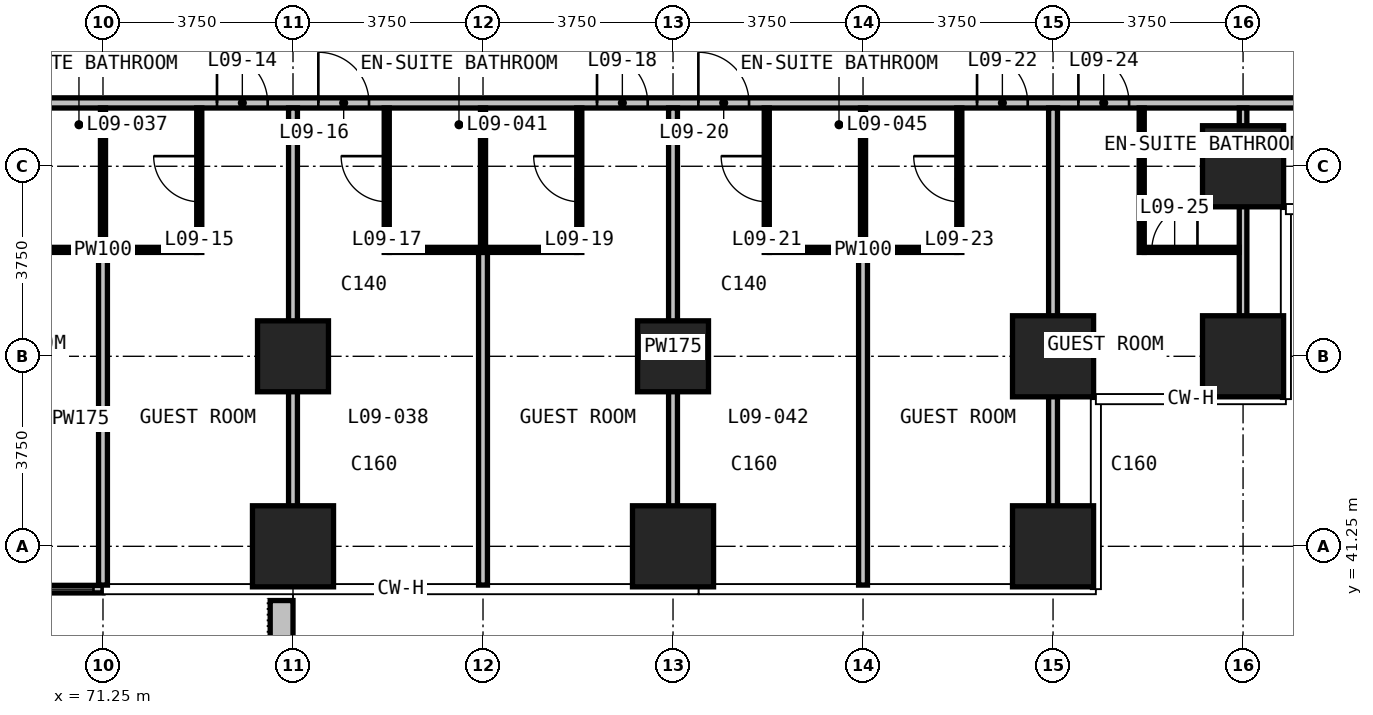
"""IFC4 building model, lengths in metres.
Left out: names, types, materials, properties, quantities, classifications, styles, units other than length and angle.
Written with IfcOpenShell. Run it as: python <this file> out.ifc"""

import sys

from ifc_helpers import new_model, si_unit, direction, frame, frame_2d, origin, origin_2d, place, context, subcontext, project, spatial, rectangle, extrude, element, fill, save


model = new_model("IFC4")
c1 = context("Model", 3, precision=1e-05, world=origin(), true_north=direction((0.0, 1.0)))
c2 = subcontext(c1, "Body", "Model", "MODEL_VIEW")
j1 = project(units=[si_unit("LENGTHUNIT", "METRE"), si_unit("PLANEANGLEUNIT", "RADIAN")], contexts=[c1])
p1 = place(None, origin())
s1 = spatial("IfcSite", under=j1, at=p1, CompositionType="ELEMENT")
p2 = place(p1, origin())
s2 = spatial("IfcBuilding", under=s1, at=p2, CompositionType="ELEMENT")
p3 = place(p2, frame((0.0, 0.0, 49.4)))
s3 = spatial("IfcBuildingStorey", under=s2, at=p3, CompositionType="ELEMENT", Elevation=49.4)
p4 = place(p3, frame((75.0, 41.25, 0.0), z_axis=(0.0, 0.0, 1.0), x_axis=(1.0, 0.0, 0.0)))
e1 = element("IfcColumn", 1, at=p4, inside=s3, PredefinedType="COLUMN", context=c2, shape_type="SweptSolid", body=[
    extrude(rectangle(XDim=1.6, YDim=1.6, at=origin_2d()), origin(), (0.0, 0.0, 1.0), 3.3),
])
p5 = place(p3, frame((75.0, 45.0, 0.0), z_axis=(0.0, 0.0, 1.0), x_axis=(1.0, 0.0, 0.0)))
e2 = element("IfcColumn", 2, at=p5, inside=s3, PredefinedType="COLUMN", context=c2, shape_type="SweptSolid", body=[
    extrude(rectangle(XDim=1.4, YDim=1.4, at=origin_2d()), origin(), (0.0, 0.0, 1.0), 3.3),
])
p6 = place(p3, frame((82.5, 41.25, 0.0), z_axis=(0.0, 0.0, 1.0), x_axis=(1.0, 0.0, 0.0)))
e3 = element("IfcColumn", 3, at=p6, inside=s3, PredefinedType="COLUMN", context=c2, shape_type="SweptSolid", body=[
    extrude(rectangle(XDim=1.6, YDim=1.6, at=origin_2d()), origin(), (0.0, 0.0, 1.0), 3.3),
])
p7 = place(p3, frame((82.5, 45.0, 0.0), z_axis=(0.0, 0.0, 1.0), x_axis=(1.0, 0.0, 0.0)))
e4 = element("IfcColumn", 4, at=p7, inside=s3, PredefinedType="COLUMN", context=c2, shape_type="SweptSolid", body=[
    extrude(rectangle(XDim=1.4, YDim=1.4, at=origin_2d()), origin(), (0.0, 0.0, 1.0), 3.3),
])
for number, where, z_axis, x_axis in (
    (5, (90.0, 41.25, 0.0), (0.0, 0.0, 1.0), (1.0, 0.0, 0.0)),
    (6, (90.0, 45.0, 0.0), (0.0, 0.0, 1.0), (1.0, 0.0, 0.0)),
    (7, (93.75, 45.0, 0.0), (0.0, 0.0, 1.0), (1.0, 0.0, 0.0)),
    (8, (93.75, 48.75, 0.0), (0.0, 0.0, 1.0), (1.0, 0.0, 0.0)),
):
    element("IfcColumn", number, at=place(p3, frame(where, z_axis=z_axis, x_axis=x_axis)), inside=s3, PredefinedType="COLUMN", context=c2, shape_type="SweptSolid", body=[
        extrude(rectangle(XDim=1.6, YDim=1.6, at=origin_2d()), origin(), (0.0, 0.0, 1.0), 3.3),
    ])
p8 = place(p3, frame((67.5, 40.405, 0.0), z_axis=(0.0, 0.0, 1.0), x_axis=(1.0, 0.0, 0.0)))
e9 = element("IfcWall", 9, at=p8, inside=s3, PredefinedType="SOLIDWALL", context=c2, shape_type="SweptSolid", body=[
    extrude(rectangle(XDim=3.75, YDim=0.15, at=frame_2d((1.875, 0.0))), origin(), (0.0, 0.0, 1.0), 3.0),
])
p9 = place(p8, frame((1.275, 0.0, 0.0)))
e10 = element("IfcOpeningElement", 10, at=p9, cuts=e9, PredefinedType="OPENING", context=c2, shape_type="SweptSolid", body=[
    extrude(rectangle(XDim=1.2, YDim=2.4, at=frame_2d((0.6, 1.2))), frame((0.0, 0.085, 0.0), z_axis=(0.0, -1.0, 0.0), x_axis=(1.0, 0.0, 0.0)), (0.0, 0.0, 1.0), 0.17),
])
p10 = place(p8, frame((2.663, 0.0, 0.1)))
e11 = element("IfcOpeningElement", 11, at=p10, cuts=e9, PredefinedType="OPENING", context=c2, shape_type="SweptSolid", body=[
    extrude(rectangle(XDim=0.9, YDim=2.4, at=frame_2d((0.45, 1.2))), frame((0.0, 0.085, 0.0), z_axis=(0.0, -1.0, 0.0), x_axis=(1.0, 0.0, 0.0)), (0.0, 0.0, 1.0), 0.17),
])
p11 = place(p3, frame((74.775, 40.18, 0.0), z_axis=(0.0, 0.0, 1.0), x_axis=(0.0, -1.0, 0.0)))
e12 = element("IfcWall", 12, at=p11, inside=s3, PredefinedType="USERDEFINED", context=c2, shape_type="SweptSolid", body=[
    extrude(rectangle(XDim=2.33, YDim=0.45, at=frame_2d((1.165, 0.0))), origin(), (0.0, 0.0, 1.0), 1.1),
])
p12 = place(p3, frame((52.575, 50.0, 0.0), z_axis=(0.0, 0.0, 1.0), x_axis=(1.0, 0.0, 0.0)))
e13 = element("IfcWall", 13, at=p12, inside=s3, PredefinedType="PARTITIONING", context=c2, shape_type="SweptSolid", body=[
    extrude(rectangle(XDim=44.85, YDim=0.2, at=frame_2d((22.425, 0.0))), origin(), (0.0, 0.0, 1.0), 3.0),
])
p13 = place(p12, frame((5.925, 0.0, 0.0)))
e14 = element("IfcOpeningElement", 14, at=p13, cuts=e13, PredefinedType="OPENING", context=c2, shape_type="SweptSolid", body=[
    extrude(rectangle(XDim=1.0, YDim=2.2, at=frame_2d((0.5, 1.1))), frame((0.0, 0.11, 0.0), z_axis=(0.0, -1.0, 0.0), x_axis=(1.0, 0.0, 0.0)), (0.0, 0.0, 1.0), 0.22),
])
p14 = place(p12, frame((7.925, 0.0, 0.0)))
e15 = element("IfcOpeningElement", 15, at=p14, cuts=e13, PredefinedType="OPENING", context=c2, shape_type="SweptSolid", body=[
    extrude(rectangle(XDim=1.0, YDim=2.2, at=frame_2d((0.5, 1.1))), frame((0.0, 0.11, 0.0), z_axis=(0.0, -1.0, 0.0), x_axis=(1.0, 0.0, 0.0)), (0.0, 0.0, 1.0), 0.22),
])
p15 = place(p12, frame((13.425, 0.0, 0.0)))
e16 = element("IfcOpeningElement", 16, at=p15, cuts=e13, PredefinedType="OPENING", context=c2, shape_type="SweptSolid", body=[
    extrude(rectangle(XDim=1.0, YDim=2.2, at=frame_2d((0.5, 1.1))), frame((0.0, 0.11, 0.0), z_axis=(0.0, -1.0, 0.0), x_axis=(1.0, 0.0, 0.0)), (0.0, 0.0, 1.0), 0.22),
])
p16 = place(p12, frame((15.425, 0.0, 0.0)))
e17 = element("IfcOpeningElement", 17, at=p16, cuts=e13, PredefinedType="OPENING", context=c2, shape_type="SweptSolid", body=[
    extrude(rectangle(XDim=1.0, YDim=2.2, at=frame_2d((0.5, 1.1))), frame((0.0, 0.11, 0.0), z_axis=(0.0, -1.0, 0.0), x_axis=(1.0, 0.0, 0.0)), (0.0, 0.0, 1.0), 0.22),
])
p17 = place(p12, frame((20.925, 0.0, 0.0)))
e18 = element("IfcOpeningElement", 18, at=p17, cuts=e13, PredefinedType="OPENING", context=c2, shape_type="SweptSolid", body=[
    extrude(rectangle(XDim=1.0, YDim=2.2, at=frame_2d((0.5, 1.1))), frame((0.0, 0.11, 0.0), z_axis=(0.0, -1.0, 0.0), x_axis=(1.0, 0.0, 0.0)), (0.0, 0.0, 1.0), 0.22),
])
p18 = place(p12, frame((22.925, 0.0, 0.0)))
e19 = element("IfcOpeningElement", 19, at=p18, cuts=e13, PredefinedType="OPENING", context=c2, shape_type="SweptSolid", body=[
    extrude(rectangle(XDim=1.0, YDim=2.2, at=frame_2d((0.5, 1.1))), frame((0.0, 0.11, 0.0), z_axis=(0.0, -1.0, 0.0), x_axis=(1.0, 0.0, 0.0)), (0.0, 0.0, 1.0), 0.22),
])
p19 = place(p12, frame((28.425, 0.0, 0.0)))
e20 = element("IfcOpeningElement", 20, at=p19, cuts=e13, PredefinedType="OPENING", context=c2, shape_type="SweptSolid", body=[
    extrude(rectangle(XDim=1.0, YDim=2.2, at=frame_2d((0.5, 1.1))), frame((0.0, 0.11, 0.0), z_axis=(0.0, -1.0, 0.0), x_axis=(1.0, 0.0, 0.0)), (0.0, 0.0, 1.0), 0.22),
])
p20 = place(p12, frame((30.425, 0.0, 0.0)))
e21 = element("IfcOpeningElement", 21, at=p20, cuts=e13, PredefinedType="OPENING", context=c2, shape_type="SweptSolid", body=[
    extrude(rectangle(XDim=1.0, YDim=2.2, at=frame_2d((0.5, 1.1))), frame((0.0, 0.11, 0.0), z_axis=(0.0, -1.0, 0.0), x_axis=(1.0, 0.0, 0.0)), (0.0, 0.0, 1.0), 0.22),
])
p21 = place(p12, frame((35.925, 0.0, 0.0)))
e22 = element("IfcOpeningElement", 22, at=p21, cuts=e13, PredefinedType="OPENING", context=c2, shape_type="SweptSolid", body=[
    extrude(rectangle(XDim=1.0, YDim=2.2, at=frame_2d((0.5, 1.1))), frame((0.0, 0.11, 0.0), z_axis=(0.0, -1.0, 0.0), x_axis=(1.0, 0.0, 0.0)), (0.0, 0.0, 1.0), 0.22),
])
p22 = place(p12, frame((37.925, 0.0, 0.0)))
e23 = element("IfcOpeningElement", 23, at=p22, cuts=e13, PredefinedType="OPENING", context=c2, shape_type="SweptSolid", body=[
    extrude(rectangle(XDim=1.0, YDim=2.2, at=frame_2d((0.5, 1.1))), frame((0.0, 0.11, 0.0), z_axis=(0.0, -1.0, 0.0), x_axis=(1.0, 0.0, 0.0)), (0.0, 0.0, 1.0), 0.22),
])
p23 = place(p12, frame((1.4, 0.0, 0.0)))
e24 = element("IfcOpeningElement", 24, at=p23, cuts=e13, PredefinedType="OPENING", context=c2, shape_type="SweptSolid", body=[
    extrude(rectangle(XDim=0.9, YDim=2.2, at=frame_2d((0.45, 1.1))), frame((0.0, 0.11, 0.0), z_axis=(0.0, -1.0, 0.0), x_axis=(1.0, 0.0, 0.0)), (0.0, 0.0, 1.0), 0.22),
])
p24 = place(p12, frame((42.575, 0.0, 0.0)))
e25 = element("IfcOpeningElement", 25, at=p24, cuts=e13, PredefinedType="OPENING", context=c2, shape_type="SweptSolid", body=[
    extrude(rectangle(XDim=0.9, YDim=2.2, at=frame_2d((0.45, 1.1))), frame((0.0, 0.11, 0.0), z_axis=(0.0, -1.0, 0.0), x_axis=(1.0, 0.0, 0.0)), (0.0, 0.0, 1.0), 0.22),
])
p25 = place(p3, frame((71.25, 40.485, 0.0), z_axis=(0.0, 0.0, 1.0), x_axis=(0.0, 1.0, 0.0)))
e26 = element("IfcWall", 26, at=p25, inside=s3, PredefinedType="PARTITIONING", context=c2, shape_type="SweptSolid", body=[
    extrude(rectangle(XDim=6.565, YDim=0.175, at=frame_2d((3.282, 0.0))), origin(), (0.0, 0.0, 1.0), 3.0),
])
p26 = place(p3, frame((75.0, 40.485, 0.0), z_axis=(0.0, 0.0, 1.0), x_axis=(0.0, 1.0, 0.0)))
e27 = element("IfcWall", 27, at=p26, inside=s3, PredefinedType="PARTITIONING", context=c2, shape_type="SweptSolid", body=[
    extrude(rectangle(XDim=9.415, YDim=0.175, at=frame_2d((4.708, 0.0))), origin(), (0.0, 0.0, 1.0), 3.0),
])
p27 = place(p3, frame((78.75, 40.485, 0.0), z_axis=(0.0, 0.0, 1.0), x_axis=(0.0, 1.0, 0.0)))
e28 = element("IfcWall", 28, at=p27, inside=s3, PredefinedType="PARTITIONING", context=c2, shape_type="SweptSolid", body=[
    extrude(rectangle(XDim=6.565, YDim=0.175, at=frame_2d((3.282, 0.0))), origin(), (0.0, 0.0, 1.0), 3.0),
])
p28 = place(p3, frame((82.5, 40.485, 0.0), z_axis=(0.0, 0.0, 1.0), x_axis=(0.0, 1.0, 0.0)))
e29 = element("IfcWall", 29, at=p28, inside=s3, PredefinedType="PARTITIONING", context=c2, shape_type="SweptSolid", body=[
    extrude(rectangle(XDim=9.415, YDim=0.175, at=frame_2d((4.708, 0.0))), origin(), (0.0, 0.0, 1.0), 3.0),
])
p29 = place(p3, frame((86.25, 40.485, 0.0), z_axis=(0.0, 0.0, 1.0), x_axis=(0.0, 1.0, 0.0)))
e30 = element("IfcWall", 30, at=p29, inside=s3, PredefinedType="PARTITIONING", context=c2, shape_type="SweptSolid", body=[
    extrude(rectangle(XDim=6.565, YDim=0.175, at=frame_2d((3.282, 0.0))), origin(), (0.0, 0.0, 1.0), 3.0),
])
p30 = place(p3, frame((90.0, 40.485, 0.0), z_axis=(0.0, 0.0, 1.0), x_axis=(0.0, 1.0, 0.0)))
e31 = element("IfcWall", 31, at=p30, inside=s3, PredefinedType="PARTITIONING", context=c2, shape_type="SweptSolid", body=[
    extrude(rectangle(XDim=9.415, YDim=0.175, at=frame_2d((4.708, 0.0))), origin(), (0.0, 0.0, 1.0), 3.0),
])
p31 = place(p3, frame((93.75, 44.235, 0.0), z_axis=(0.0, 0.0, 1.0), x_axis=(0.0, 1.0, 0.0)))
e32 = element("IfcWall", 32, at=p31, inside=s3, PredefinedType="PARTITIONING", context=c2, shape_type="SweptSolid", body=[
    extrude(rectangle(XDim=5.665, YDim=0.15, at=frame_2d((2.833, 0.0))), origin(), (0.0, 0.0, 1.0), 3.0),
])
for number, where, z_axis, x_axis in (
    (33, (69.4, 47.1, 0.0), (0.0, 0.0, 1.0), (1.0, 0.0, 0.0)),
    (34, (76.9, 47.1, 0.0), (0.0, 0.0, 1.0), (1.0, 0.0, 0.0)),
    (35, (84.4, 47.1, 0.0), (0.0, 0.0, 1.0), (1.0, 0.0, 0.0)),
):
    element("IfcWall", number, at=place(p3, frame(where, z_axis=z_axis, x_axis=x_axis)), inside=s3, PredefinedType="PARTITIONING", context=c2, shape_type="SweptSolid", body=[
        extrude(rectangle(XDim=3.7, YDim=0.1, at=frame_2d((1.85, 0.0))), origin(), (0.0, 0.0, 1.0), 3.0),
    ])
p32 = place(p3, frame((91.8, 47.1, 0.0), z_axis=(0.0, 0.0, 1.0), x_axis=(1.0, 0.0, 0.0)))
e36 = element("IfcWall", 36, at=p32, inside=s3, PredefinedType="PARTITIONING", context=c2, shape_type="SweptSolid", body=[
    extrude(rectangle(XDim=1.875, YDim=0.1, at=frame_2d((0.938, 0.0))), origin(), (0.0, 0.0, 1.0), 3.0),
])
p33 = place(p32, frame((0.15, 0.0, 0.0)))
e37 = element("IfcOpeningElement", 37, at=p33, cuts=e36, PredefinedType="OPENING", context=c2, shape_type="SweptSolid", body=[
    extrude(rectangle(XDim=0.9, YDim=2.2, at=frame_2d((0.45, 1.1))), frame((0.0, 0.06, 0.0), z_axis=(0.0, -1.0, 0.0), x_axis=(1.0, 0.0, 0.0)), (0.0, 0.0, 1.0), 0.12),
])
p34 = place(p3, frame((71.25, 47.15, 0.0), z_axis=(0.0, 0.0, 1.0), x_axis=(0.0, 1.0, 0.0)))
e38 = element("IfcWall", 38, at=p34, inside=s3, PredefinedType="PARTITIONING", context=c2, shape_type="SweptSolid", body=[
    extrude(rectangle(XDim=2.75, YDim=0.1, at=frame_2d((1.375, 0.0))), origin(), (0.0, 0.0, 1.0), 3.0),
])
p35 = place(p3, frame((73.15, 47.05, 0.0), z_axis=(0.0, 0.0, 1.0), x_axis=(0.0, 1.0, 0.0)))
e39 = element("IfcWall", 39, at=p35, inside=s3, PredefinedType="PARTITIONING", context=c2, shape_type="SweptSolid", body=[
    extrude(rectangle(XDim=2.85, YDim=0.1, at=frame_2d((1.425, 0.0))), origin(), (0.0, 0.0, 1.0), 3.0),
])
p36 = place(p35, frame((1.0, 0.0, 0.0)))
e40 = element("IfcOpeningElement", 40, at=p36, cuts=e39, PredefinedType="OPENING", context=c2, shape_type="SweptSolid", body=[
    extrude(rectangle(XDim=0.9, YDim=2.2, at=frame_2d((0.45, 1.1))), frame((0.0, 0.06, 0.0), z_axis=(0.0, -1.0, 0.0), x_axis=(1.0, 0.0, 0.0)), (0.0, 0.0, 1.0), 0.12),
])
p37 = place(p3, frame((76.85, 47.05, 0.0), z_axis=(0.0, 0.0, 1.0), x_axis=(0.0, 1.0, 0.0)))
e41 = element("IfcWall", 41, at=p37, inside=s3, PredefinedType="PARTITIONING", context=c2, shape_type="SweptSolid", body=[
    extrude(rectangle(XDim=2.85, YDim=0.1, at=frame_2d((1.425, 0.0))), origin(), (0.0, 0.0, 1.0), 3.0),
])
p38 = place(p37, frame((1.0, 0.0, 0.0)))
e42 = element("IfcOpeningElement", 42, at=p38, cuts=e41, PredefinedType="OPENING", context=c2, shape_type="SweptSolid", body=[
    extrude(rectangle(XDim=0.9, YDim=2.2, at=frame_2d((0.45, 1.1))), frame((0.0, 0.06, 0.0), z_axis=(0.0, -1.0, 0.0), x_axis=(1.0, 0.0, 0.0)), (0.0, 0.0, 1.0), 0.12),
])
p39 = place(p3, frame((78.75, 47.15, 0.0), z_axis=(0.0, 0.0, 1.0), x_axis=(0.0, 1.0, 0.0)))
e43 = element("IfcWall", 43, at=p39, inside=s3, PredefinedType="PARTITIONING", context=c2, shape_type="SweptSolid", body=[
    extrude(rectangle(XDim=2.75, YDim=0.1, at=frame_2d((1.375, 0.0))), origin(), (0.0, 0.0, 1.0), 3.0),
])
p40 = place(p3, frame((80.65, 47.05, 0.0), z_axis=(0.0, 0.0, 1.0), x_axis=(0.0, 1.0, 0.0)))
e44 = element("IfcWall", 44, at=p40, inside=s3, PredefinedType="PARTITIONING", context=c2, shape_type="SweptSolid", body=[
    extrude(rectangle(XDim=2.85, YDim=0.1, at=frame_2d((1.425, 0.0))), origin(), (0.0, 0.0, 1.0), 3.0),
])
p41 = place(p40, frame((1.0, 0.0, 0.0)))
e45 = element("IfcOpeningElement", 45, at=p41, cuts=e44, PredefinedType="OPENING", context=c2, shape_type="SweptSolid", body=[
    extrude(rectangle(XDim=0.9, YDim=2.2, at=frame_2d((0.45, 1.1))), frame((0.0, 0.06, 0.0), z_axis=(0.0, -1.0, 0.0), x_axis=(1.0, 0.0, 0.0)), (0.0, 0.0, 1.0), 0.12),
])
p42 = place(p3, frame((84.35, 47.05, 0.0), z_axis=(0.0, 0.0, 1.0), x_axis=(0.0, 1.0, 0.0)))
e46 = element("IfcWall", 46, at=p42, inside=s3, PredefinedType="PARTITIONING", context=c2, shape_type="SweptSolid", body=[
    extrude(rectangle(XDim=2.85, YDim=0.1, at=frame_2d((1.425, 0.0))), origin(), (0.0, 0.0, 1.0), 3.0),
])
p43 = place(p42, frame((1.0, 0.0, 0.0)))
e47 = element("IfcOpeningElement", 47, at=p43, cuts=e46, PredefinedType="OPENING", context=c2, shape_type="SweptSolid", body=[
    extrude(rectangle(XDim=0.9, YDim=2.2, at=frame_2d((0.45, 1.1))), frame((0.0, 0.06, 0.0), z_axis=(0.0, -1.0, 0.0), x_axis=(1.0, 0.0, 0.0)), (0.0, 0.0, 1.0), 0.12),
])
p44 = place(p3, frame((86.25, 47.15, 0.0), z_axis=(0.0, 0.0, 1.0), x_axis=(0.0, 1.0, 0.0)))
e48 = element("IfcWall", 48, at=p44, inside=s3, PredefinedType="PARTITIONING", context=c2, shape_type="SweptSolid", body=[
    extrude(rectangle(XDim=2.75, YDim=0.1, at=frame_2d((1.375, 0.0))), origin(), (0.0, 0.0, 1.0), 3.0),
])
p45 = place(p3, frame((88.15, 47.05, 0.0), z_axis=(0.0, 0.0, 1.0), x_axis=(0.0, 1.0, 0.0)))
e49 = element("IfcWall", 49, at=p45, inside=s3, PredefinedType="PARTITIONING", context=c2, shape_type="SweptSolid", body=[
    extrude(rectangle(XDim=2.85, YDim=0.1, at=frame_2d((1.425, 0.0))), origin(), (0.0, 0.0, 1.0), 3.0),
])
p46 = place(p45, frame((1.0, 0.0, 0.0)))
e50 = element("IfcOpeningElement", 50, at=p46, cuts=e49, PredefinedType="OPENING", context=c2, shape_type="SweptSolid", body=[
    extrude(rectangle(XDim=0.9, YDim=2.2, at=frame_2d((0.45, 1.1))), frame((0.0, 0.06, 0.0), z_axis=(0.0, -1.0, 0.0), x_axis=(1.0, 0.0, 0.0)), (0.0, 0.0, 1.0), 0.12),
])
p47 = place(p3, frame((91.75, 47.05, 0.0), z_axis=(0.0, 0.0, 1.0), x_axis=(0.0, 1.0, 0.0)))
e51 = element("IfcWall", 51, at=p47, inside=s3, PredefinedType="PARTITIONING", context=c2, shape_type="SweptSolid", body=[
    extrude(rectangle(XDim=2.85, YDim=0.1, at=frame_2d((1.425, 0.0))), origin(), (0.0, 0.0, 1.0), 3.0),
])
p48 = place(p10, origin())
e52 = element("IfcWindow", 52, at=p48, inside=s3, PartitioningType="SINGLE_PANEL", PredefinedType="WINDOW", context=c2, shape_type="SweptSolid", body=[
    extrude(rectangle(XDim=0.9, YDim=2.4, at=frame_2d((0.45, 1.2))), frame((0.0, 0.03, 0.0), z_axis=(0.0, -1.0, 0.0), x_axis=(1.0, 0.0, 0.0)), (0.0, 0.0, 1.0), 0.06),
])
fill(e11, e52)
p49 = place(p17, origin())
e53 = element("IfcDoor", 53, at=p49, inside=s3, OperationType="SINGLE_SWING_RIGHT", PredefinedType="DOOR", context=c2, shape_type="SweptSolid", body=[
    extrude(rectangle(XDim=1.0, YDim=2.2, at=frame_2d((0.5, 1.1))), frame((0.0, 0.025, 0.0), z_axis=(0.0, -1.0, 0.0), x_axis=(1.0, 0.0, 0.0)), (0.0, 0.0, 1.0), 0.05),
])
fill(e18, e53)
p50 = place(p36, origin())
e54 = element("IfcDoor", 54, at=p50, inside=s3, OperationType="SINGLE_SWING_RIGHT", PredefinedType="DOOR", context=c2, shape_type="SweptSolid", body=[
    extrude(rectangle(XDim=0.9, YDim=2.2, at=frame_2d((0.45, 1.1))), frame((0.0, 0.025, 0.0), z_axis=(0.0, -1.0, 0.0), x_axis=(1.0, 0.0, 0.0)), (0.0, 0.0, 1.0), 0.05),
])
fill(e40, e54)
p51 = place(p18, origin())
e55 = element("IfcDoor", 55, at=p51, inside=s3, OperationType="SINGLE_SWING_LEFT", PredefinedType="DOOR", context=c2, shape_type="SweptSolid", body=[
    extrude(rectangle(XDim=1.0, YDim=2.2, at=frame_2d((0.5, 1.1))), frame((0.0, 0.025, 0.0), z_axis=(0.0, -1.0, 0.0), x_axis=(1.0, 0.0, 0.0)), (0.0, 0.0, 1.0), 0.05),
])
fill(e19, e55)
p52 = place(p38, origin())
e56 = element("IfcDoor", 56, at=p52, inside=s3, OperationType="SINGLE_SWING_RIGHT", PredefinedType="DOOR", context=c2, shape_type="SweptSolid", body=[
    extrude(rectangle(XDim=0.9, YDim=2.2, at=frame_2d((0.45, 1.1))), frame((0.0, 0.025, 0.0), z_axis=(0.0, -1.0, 0.0), x_axis=(1.0, 0.0, 0.0)), (0.0, 0.0, 1.0), 0.05),
])
fill(e42, e56)
p53 = place(p19, origin())
e57 = element("IfcDoor", 57, at=p53, inside=s3, OperationType="SINGLE_SWING_RIGHT", PredefinedType="DOOR", context=c2, shape_type="SweptSolid", body=[
    extrude(rectangle(XDim=1.0, YDim=2.2, at=frame_2d((0.5, 1.1))), frame((0.0, 0.025, 0.0), z_axis=(0.0, -1.0, 0.0), x_axis=(1.0, 0.0, 0.0)), (0.0, 0.0, 1.0), 0.05),
])
fill(e20, e57)
p54 = place(p41, origin())
e58 = element("IfcDoor", 58, at=p54, inside=s3, OperationType="SINGLE_SWING_RIGHT", PredefinedType="DOOR", context=c2, shape_type="SweptSolid", body=[
    extrude(rectangle(XDim=0.9, YDim=2.2, at=frame_2d((0.45, 1.1))), frame((0.0, 0.025, 0.0), z_axis=(0.0, -1.0, 0.0), x_axis=(1.0, 0.0, 0.0)), (0.0, 0.0, 1.0), 0.05),
])
fill(e45, e58)
p55 = place(p20, origin())
e59 = element("IfcDoor", 59, at=p55, inside=s3, OperationType="SINGLE_SWING_LEFT", PredefinedType="DOOR", context=c2, shape_type="SweptSolid", body=[
    extrude(rectangle(XDim=1.0, YDim=2.2, at=frame_2d((0.5, 1.1))), frame((0.0, 0.025, 0.0), z_axis=(0.0, -1.0, 0.0), x_axis=(1.0, 0.0, 0.0)), (0.0, 0.0, 1.0), 0.05),
])
fill(e21, e59)
p56 = place(p43, origin())
e60 = element("IfcDoor", 60, at=p56, inside=s3, OperationType="SINGLE_SWING_RIGHT", PredefinedType="DOOR", context=c2, shape_type="SweptSolid", body=[
    extrude(rectangle(XDim=0.9, YDim=2.2, at=frame_2d((0.45, 1.1))), frame((0.0, 0.025, 0.0), z_axis=(0.0, -1.0, 0.0), x_axis=(1.0, 0.0, 0.0)), (0.0, 0.0, 1.0), 0.05),
])
fill(e47, e60)
p57 = place(p21, origin())
e61 = element("IfcDoor", 61, at=p57, inside=s3, OperationType="SINGLE_SWING_LEFT", PredefinedType="DOOR", context=c2, shape_type="SweptSolid", body=[
    extrude(rectangle(XDim=1.0, YDim=2.2, at=frame_2d((0.5, 1.1))), frame((0.0, 0.025, 0.0), z_axis=(0.0, -1.0, 0.0), x_axis=(1.0, 0.0, 0.0)), (0.0, 0.0, 1.0), 0.05),
])
fill(e22, e61)
p58 = place(p46, origin())
e62 = element("IfcDoor", 62, at=p58, inside=s3, OperationType="SINGLE_SWING_RIGHT", PredefinedType="DOOR", context=c2, shape_type="SweptSolid", body=[
    extrude(rectangle(XDim=0.9, YDim=2.2, at=frame_2d((0.45, 1.1))), frame((0.0, 0.025, 0.0), z_axis=(0.0, -1.0, 0.0), x_axis=(1.0, 0.0, 0.0)), (0.0, 0.0, 1.0), 0.05),
])
fill(e50, e62)
p59 = place(p22, origin())
e63 = element("IfcDoor", 63, at=p59, inside=s3, OperationType="SINGLE_SWING_RIGHT", PredefinedType="DOOR", context=c2, shape_type="SweptSolid", body=[
    extrude(rectangle(XDim=1.0, YDim=2.2, at=frame_2d((0.5, 1.1))), frame((0.0, 0.025, 0.0), z_axis=(0.0, -1.0, 0.0), x_axis=(1.0, 0.0, 0.0)), (0.0, 0.0, 1.0), 0.05),
])
fill(e23, e63)
p60 = place(p33, origin())
e64 = element("IfcDoor", 64, at=p60, inside=s3, OperationType="SINGLE_SWING_RIGHT", PredefinedType="DOOR", context=c2, shape_type="SweptSolid", body=[
    extrude(rectangle(XDim=0.9, YDim=2.2, at=frame_2d((0.45, 1.1))), frame((0.0, 0.025, 0.0), z_axis=(0.0, -1.0, 0.0), x_axis=(1.0, 0.0, 0.0)), (0.0, 0.0, 1.0), 0.05),
])
fill(e37, e64)
save(model, sys.argv[1])
